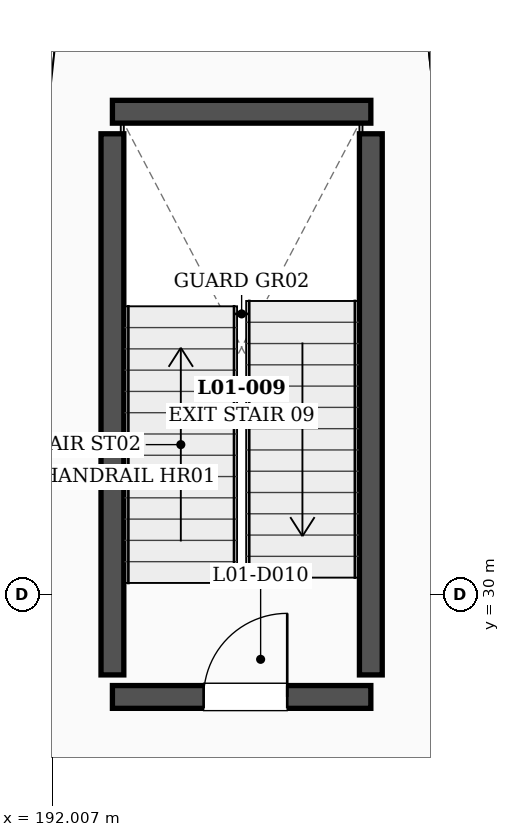
"""IFC4 building model, lengths in metres.
Left out: names, types, materials, properties, quantities, classifications, styles, units other than length and angle.
Written with IfcOpenShell. Run it as: python <this file> out.ifc"""

import sys

from ifc_helpers import new_model, si_unit, direction, frame, frame_2d, origin, place, context, subcontext, project, spatial, rectangle, extrude, element, fill, save


model = new_model("IFC4")
c1 = context("Model", 3, precision=1e-05, world=origin(), true_north=direction((0.0, 1.0)))
c2 = subcontext(c1, "Body", "Model", "MODEL_VIEW")
j1 = project(units=[si_unit("LENGTHUNIT", "METRE"), si_unit("PLANEANGLEUNIT", "RADIAN")], contexts=[c1])
p1 = place(None, origin())
s1 = spatial("IfcSite", under=j1, at=p1, CompositionType="ELEMENT")
p2 = place(p1, origin())
s2 = spatial("IfcBuilding", under=s1, at=p2, CompositionType="ELEMENT")
p3 = place(p2, frame((0.0, 0.0, 6.0)))
s3 = spatial("IfcBuildingStorey", under=s2, at=p3, CompositionType="ELEMENT", Elevation=6.0)
p4 = place(p3, frame((192.8, 28.65, 0.0), z_axis=(0.0, 0.0, 1.0), x_axis=(1.0, 0.0, 0.0)))
e1 = element("IfcWall", 1, at=p4, inside=s3, PredefinedType="SHEAR", context=c2, shape_type="SweptSolid", body=[
    extrude(rectangle(XDim=3.4, YDim=0.3, at=frame_2d((1.7, 0.0))), origin(), (0.0, 0.0, 1.0), 4.8),
])
p5 = place(p4, frame((1.2, 0.0, 0.0)))
e2 = element("IfcOpeningElement", 2, at=p5, cuts=e1, PredefinedType="OPENING", context=c2, shape_type="SweptSolid", body=[
    extrude(rectangle(XDim=1.1, YDim=2.2, at=frame_2d((0.55, 1.1))), frame((0.0, 0.16, 0.0), z_axis=(0.0, -1.0, 0.0), x_axis=(1.0, 0.0, 0.0)), (0.0, 0.0, 1.0), 0.32),
])
p6 = place(p3, frame((192.8, 36.35, 0.0), z_axis=(0.0, 0.0, 1.0), x_axis=(1.0, 0.0, 0.0)))
e3 = element("IfcWall", 3, at=p6, inside=s3, PredefinedType="SHEAR", context=c2, shape_type="SweptSolid", body=[
    extrude(rectangle(XDim=3.4, YDim=0.3, at=frame_2d((1.7, 0.0))), origin(), (0.0, 0.0, 1.0), 4.8),
])
for number, where, z_axis, x_axis in (
    (4, (192.8, 28.94, 0.0), (0.0, 0.0, 1.0), (0.0, 1.0, 0.0)),
    (5, (196.2, 28.94, 0.0), (0.0, 0.0, 1.0), (0.0, 1.0, 0.0)),
):
    element("IfcWall", number, at=place(p3, frame(where, z_axis=z_axis, x_axis=x_axis)), inside=s3, PredefinedType="SHEAR", context=c2, shape_type="SweptSolid", body=[
        extrude(rectangle(XDim=7.12, YDim=0.3, at=frame_2d((3.56, 0.0))), origin(), (0.0, 0.0, 1.0), 4.8),
    ])
p7 = place(p5, origin())
e6 = element("IfcDoor", 6, at=p7, inside=s3, OperationType="SINGLE_SWING_RIGHT", PredefinedType="DOOR", context=c2, shape_type="SweptSolid", body=[
    extrude(rectangle(XDim=1.1, YDim=2.2, at=frame_2d((0.55, 1.1))), frame((0.0, 0.025, 0.0), z_axis=(0.0, -1.0, 0.0), x_axis=(1.0, 0.0, 0.0)), (0.0, 0.0, 1.0), 0.05),
])
fill(e2, e6)
save(model, sys.argv[1])
